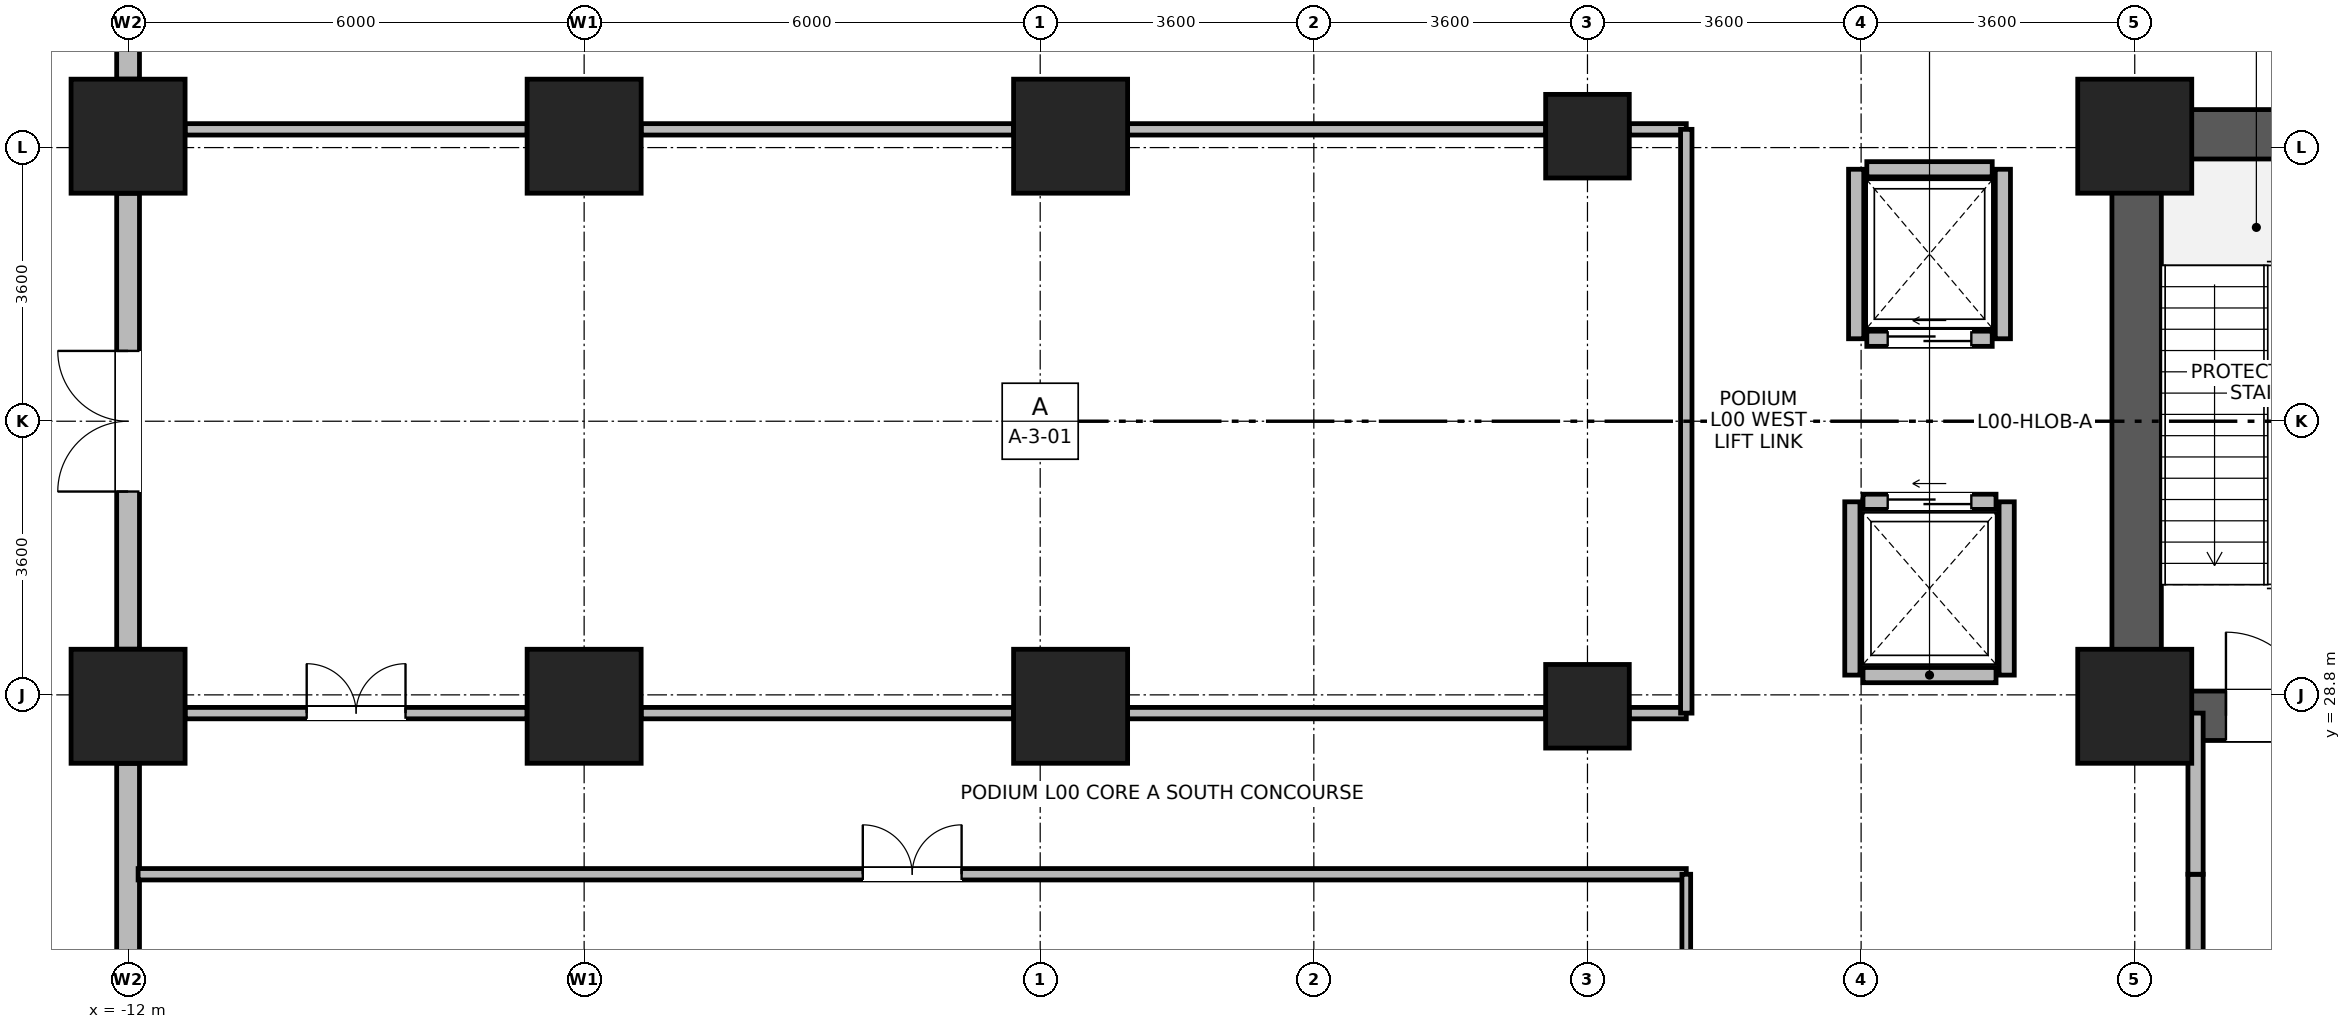
"""IFC4 building model, lengths in metres.
Left out: names, types, materials, properties, quantities, classifications, styles, units other than length and angle.
Written with IfcOpenShell. Run it as: python <this file> out.ifc"""

import sys

from ifc_helpers import new_model, si_unit, direction, frame, frame_2d, origin, origin_2d, place, context, subcontext, project, spatial, rectangle, circle, extrude, source, transform, mapped, element, fill, save


model = new_model("IFC4")
c1 = context("Model", 3, precision=1e-05, world=origin(), true_north=direction((0.0, 1.0)))
c2 = subcontext(c1, "Body", "Model", "MODEL_VIEW")
j1 = project(units=[si_unit("LENGTHUNIT", "METRE"), si_unit("PLANEANGLEUNIT", "RADIAN")], contexts=[c1])
p1 = place(None, origin())
s1 = spatial("IfcSite", under=j1, at=p1, CompositionType="ELEMENT")
p2 = place(p1, origin())
s2 = spatial("IfcBuilding", under=s1, at=p2, CompositionType="ELEMENT")
p3 = place(p2, origin())
s3 = spatial("IfcBuildingStorey", under=s2, at=p3, CompositionType="ELEMENT", Elevation=0.0)
p4 = place(p3, frame((14.425, 28.2, 0.0), z_axis=(0.0, 0.0, 1.0), x_axis=(0.0, 1.0, 0.0)))
e1 = element("IfcWall", 1, at=p4, inside=s3, PredefinedType="SHEAR", context=c2, shape_type="SweptSolid", body=[
    extrude(rectangle(XDim=8.3, YDim=0.65, at=frame_2d((4.15, 0.0))), origin(), (0.0, 0.0, 1.0), 5.12),
])
p5 = place(p3, frame((14.75, 28.525, 0.0), z_axis=(0.0, 0.0, 1.0), x_axis=(1.0, 0.0, 0.0)))
e2 = element("IfcWall", 2, at=p5, inside=s3, PredefinedType="SHEAR", context=c2, shape_type="SweptSolid", body=[
    extrude(rectangle(XDim=3.2, YDim=0.65, at=frame_2d((1.6, 0.0))), origin(), (0.0, 0.0, 1.0), 5.12),
])
p6 = place(p5, frame((0.85, 0.0, 0.0)))
e3 = element("IfcOpeningElement", 3, at=p6, cuts=e2, PredefinedType="OPENING", context=c2, shape_type="SweptSolid", body=[
    extrude(rectangle(XDim=1.1, YDim=2.08, at=frame_2d((0.55, 1.04))), frame((0.0, 0.335, 0.0), z_axis=(0.0, -1.0, 0.0), x_axis=(1.0, 0.0, 0.0)), (0.0, 0.0, 1.0), 0.67),
])
p7 = place(p3, frame((14.75, 36.175, 0.0), z_axis=(0.0, 0.0, 1.0), x_axis=(1.0, 0.0, 0.0)))
e4 = element("IfcWall", 4, at=p7, inside=s3, PredefinedType="SHEAR", context=c2, shape_type="SweptSolid", body=[
    extrude(rectangle(XDim=3.2, YDim=0.65, at=frame_2d((1.6, 0.0))), origin(), (0.0, 0.0, 1.0), 5.12),
])
m1 = source(origin(), c2, "Body", "SweptSolid", [
    extrude(circle(Radius=0.55, at=origin_2d()), origin(), (0.0, 0.0, 1.0), 5.4),
])
for number, where, z_axis, x_axis in (
    (5, (7.2, 28.65, 0.0), (0.0, 0.0, 1.0), (1.0, 0.0, 0.0)),
    (6, (7.2, 36.15, 0.0), (0.0, 0.0, 1.0), (1.0, 0.0, 0.0)),
):
    element("IfcColumn", number, at=place(p3, frame(where, z_axis=z_axis, x_axis=x_axis)), inside=s3, PredefinedType="COLUMN", context=c2, shape_type="MappedRepresentation", body=[
        mapped(m1, transform((0.0, 0.0, 0.0), x_axis=(1.0, 0.0, 0.0), y_axis=(0.0, 1.0, 0.0), z_axis=(0.0, 0.0, 1.0), scale=1.0)),
    ])
m2 = source(origin(), c2, "Body", "SweptSolid", [
    extrude(rectangle(XDim=1.5, YDim=1.5, at=origin_2d()), origin(), (0.0, 0.0, 1.0), 5.4),
])
for number, where, z_axis, x_axis in (
    (7, (14.4, 28.65, 0.0), (0.0, 0.0, 1.0), (1.0, 0.0, 0.0)),
    (8, (14.4, 36.15, 0.0), (0.0, 0.0, 1.0), (1.0, 0.0, 0.0)),
    (9, (0.4, 28.65, 0.0), (0.0, 0.0, 1.0), (1.0, 0.0, 0.0)),
    (10, (0.4, 36.15, 0.0), (0.0, 0.0, 1.0), (1.0, 0.0, 0.0)),
    (11, (-12.0, 28.65, 0.0), (0.0, 0.0, 1.0), (1.0, 0.0, 0.0)),
    (12, (-12.0, 36.15, 0.0), (0.0, 0.0, 1.0), (1.0, 0.0, 0.0)),
    (13, (-6.0, 28.65, 0.0), (0.0, 0.0, 1.0), (1.0, 0.0, 0.0)),
    (14, (-6.0, 36.15, 0.0), (0.0, 0.0, 1.0), (1.0, 0.0, 0.0)),
):
    element("IfcColumn", number, at=place(p3, frame(where, z_axis=z_axis, x_axis=x_axis)), inside=s3, PredefinedType="COLUMN", context=c2, shape_type="MappedRepresentation", body=[
        mapped(m2, transform((0.0, 0.0, 0.0), x_axis=(1.0, 0.0, 0.0), y_axis=(0.0, 1.0, 0.0), z_axis=(0.0, 0.0, 1.0), scale=1.0)),
    ])
p8 = place(p3, frame((-12.0, 36.901, 0.0), z_axis=(0.0, 0.0, 1.0), x_axis=(0.0, 1.0, 0.0)))
e15 = element("IfcWall", 15, at=p8, inside=s3, PredefinedType="STANDARD", context=c2, shape_type="SweptSolid", body=[
    extrude(rectangle(XDim=7.198, YDim=0.3, at=frame_2d((3.599, 0.0))), origin(), (0.0, 0.0, 1.0), 4.5),
])
p9 = place(p8, frame((4.198, 0.0, 0.9)))
e16 = element("IfcOpeningElement", 16, at=p9, cuts=e15, PredefinedType="OPENING", context=c2, shape_type="SweptSolid", body=[
    extrude(rectangle(XDim=2.4, YDim=2.5, at=frame_2d((1.2, 1.25))), frame((0.0, 0.16, 0.0), z_axis=(0.0, -1.0, 0.0), x_axis=(1.0, 0.0, 0.0)), (0.0, 0.0, 1.0), 0.32),
])
p10 = place(p8, frame((2.548, 0.0, 0.9)))
e17 = element("IfcOpeningElement", 17, at=p10, cuts=e15, PredefinedType="OPENING", context=c2, shape_type="SweptSolid", body=[
    extrude(rectangle(XDim=0.95, YDim=1.75, at=frame_2d((0.475, 0.875))), frame((0.0, 0.16, 0.0), z_axis=(0.0, -1.0, 0.0), x_axis=(1.0, 0.0, 0.0)), (0.0, 0.0, 1.0), 0.32),
])
p11 = place(p3, frame((-12.0, 29.401, 0.0), z_axis=(0.0, 0.0, 1.0), x_axis=(0.0, 1.0, 0.0)))
e18 = element("IfcWall", 18, at=p11, inside=s3, PredefinedType="STANDARD", context=c2, shape_type="SweptSolid", body=[
    extrude(rectangle(XDim=5.998, YDim=0.3, at=frame_2d((2.999, 0.0))), origin(), (0.0, 0.0, 1.0), 4.5),
])
p12 = place(p11, frame((2.074, 0.0, 0.0)))
e19 = element("IfcOpeningElement", 19, at=p12, cuts=e18, PredefinedType="OPENING", context=c2, shape_type="SweptSolid", body=[
    extrude(rectangle(XDim=1.85, YDim=2.25, at=frame_2d((0.925, 1.125))), frame((0.0, 0.16, 0.0), z_axis=(0.0, -1.0, 0.0), x_axis=(1.0, 0.0, 0.0)), (0.0, 0.0, 1.0), 0.32),
])
p13 = place(p3, frame((-12.0, 18.751, 0.0), z_axis=(0.0, 0.0, 1.0), x_axis=(0.0, 1.0, 0.0)))
e20 = element("IfcWall", 20, at=p13, inside=s3, PredefinedType="STANDARD", context=c2, shape_type="SweptSolid", body=[
    extrude(rectangle(XDim=9.148, YDim=0.3, at=frame_2d((4.574, 0.0))), origin(), (0.0, 0.0, 1.0), 4.5),
])
p14 = place(p13, frame((0.325, 0.0, 0.9)))
e21 = element("IfcOpeningElement", 21, at=p14, cuts=e20, PredefinedType="OPENING", context=c2, shape_type="SweptSolid", body=[
    extrude(rectangle(XDim=2.4, YDim=2.5, at=frame_2d((1.2, 1.25))), frame((0.0, 0.16, 0.0), z_axis=(0.0, -1.0, 0.0), x_axis=(1.0, 0.0, 0.0)), (0.0, 0.0, 1.0), 0.32),
])
p15 = place(p13, frame((3.374, 0.0, 0.9)))
e22 = element("IfcOpeningElement", 22, at=p15, cuts=e20, PredefinedType="OPENING", context=c2, shape_type="SweptSolid", body=[
    extrude(rectangle(XDim=2.4, YDim=2.5, at=frame_2d((1.2, 1.25))), frame((0.0, 0.16, 0.0), z_axis=(0.0, -1.0, 0.0), x_axis=(1.0, 0.0, 0.0)), (0.0, 0.0, 1.0), 0.32),
])
p16 = place(p3, frame((10.825, 29.06, 0.0), z_axis=(0.0, 0.0, 1.0), x_axis=(1.0, 0.0, 0.0)))
e23 = element("IfcWall", 23, at=p16, inside=s3, PredefinedType="PARTITIONING", context=c2, shape_type="SweptSolid", body=[
    extrude(rectangle(XDim=1.75, YDim=0.2, at=frame_2d((0.875, 0.0))), origin(), (0.0, 0.0, 1.0), 5.1),
])
p17 = place(p3, frame((10.825, 31.34, 0.0), z_axis=(0.0, 0.0, 1.0), x_axis=(1.0, 0.0, 0.0)))
e24 = element("IfcWall", 24, at=p17, inside=s3, PredefinedType="PARTITIONING", context=c2, shape_type="SweptSolid", body=[
    extrude(rectangle(XDim=1.75, YDim=0.2, at=frame_2d((0.875, 0.0))), origin(), (0.0, 0.0, 1.0), 5.1),
])
p18 = place(p17, frame((0.325, 0.0, 0.0)))
e25 = element("IfcOpeningElement", 25, at=p18, cuts=e24, PredefinedType="OPENING", context=c2, shape_type="SweptSolid", body=[
    extrude(rectangle(XDim=1.1, YDim=2.12, at=frame_2d((0.55, 1.06))), frame((0.0, 0.11, 0.0), z_axis=(0.0, -1.0, 0.0), x_axis=(1.0, 0.0, 0.0)), (0.0, 0.0, 1.0), 0.22),
])
for number, where, z_axis, x_axis in (
    (26, (10.685, 29.06, 0.0), (0.0, 0.0, 1.0), (0.0, 1.0, 0.0)),
    (27, (12.715, 29.06, 0.0), (0.0, 0.0, 1.0), (0.0, 1.0, 0.0)),
):
    element("IfcWall", number, at=place(p3, frame(where, z_axis=z_axis, x_axis=x_axis)), inside=s3, PredefinedType="PARTITIONING", context=c2, shape_type="SweptSolid", body=[
        extrude(rectangle(XDim=2.28, YDim=0.2, at=frame_2d((1.14, 0.0))), origin(), (0.0, 0.0, 1.0), 5.1),
    ])
p19 = place(p3, frame((10.875, 33.485, 0.0), z_axis=(0.0, 0.0, 1.0), x_axis=(1.0, 0.0, 0.0)))
e28 = element("IfcWall", 28, at=p19, inside=s3, PredefinedType="PARTITIONING", context=c2, shape_type="SweptSolid", body=[
    extrude(rectangle(XDim=1.65, YDim=0.2, at=frame_2d((0.825, 0.0))), origin(), (0.0, 0.0, 1.0), 5.1),
])
p20 = place(p19, frame((0.275, 0.0, 0.0)))
e29 = element("IfcOpeningElement", 29, at=p20, cuts=e28, PredefinedType="OPENING", context=c2, shape_type="SweptSolid", body=[
    extrude(rectangle(XDim=1.1, YDim=2.12, at=frame_2d((0.55, 1.06))), frame((0.0, 0.11, 0.0), z_axis=(0.0, -1.0, 0.0), x_axis=(1.0, 0.0, 0.0)), (0.0, 0.0, 1.0), 0.22),
])
p21 = place(p3, frame((10.875, 35.715, 0.0), z_axis=(0.0, 0.0, 1.0), x_axis=(1.0, 0.0, 0.0)))
e30 = element("IfcWall", 30, at=p21, inside=s3, PredefinedType="PARTITIONING", context=c2, shape_type="SweptSolid", body=[
    extrude(rectangle(XDim=1.65, YDim=0.2, at=frame_2d((0.825, 0.0))), origin(), (0.0, 0.0, 1.0), 5.1),
])
for number, where, z_axis, x_axis in (
    (31, (10.735, 33.485, 0.0), (0.0, 0.0, 1.0), (0.0, 1.0, 0.0)),
    (32, (12.665, 33.485, 0.0), (0.0, 0.0, 1.0), (0.0, 1.0, 0.0)),
):
    element("IfcWall", number, at=place(p3, frame(where, z_axis=z_axis, x_axis=x_axis)), inside=s3, PredefinedType="PARTITIONING", context=c2, shape_type="SweptSolid", body=[
        extrude(rectangle(XDim=2.23, YDim=0.2, at=frame_2d((1.115, 0.0))), origin(), (0.0, 0.0, 1.0), 5.1),
    ])
p22 = place(p3, frame((15.2, 18.132, 0.0), z_axis=(0.0, 0.0, 1.0), x_axis=(0.0, 1.0, 0.0)))
e33 = element("IfcWall", 33, at=p22, inside=s3, PredefinedType="PARTITIONING", context=c2, shape_type="SweptSolid", body=[
    extrude(rectangle(XDim=8.308, YDim=0.2, at=frame_2d((4.154, 0.0))), origin(), (0.0, 0.0, 1.0), 5.1),
])
p23 = place(p3, frame((15.2, 26.44, 0.0), z_axis=(0.0, 0.0, 1.0), x_axis=(0.0, 1.0, 0.0)))
e34 = element("IfcWall", 34, at=p23, inside=s3, PredefinedType="PARTITIONING", context=c2, shape_type="SweptSolid", body=[
    extrude(rectangle(XDim=2.12, YDim=0.2, at=frame_2d((1.06, 0.0))), origin(), (0.0, 0.0, 1.0), 5.1),
])
p24 = place(p3, frame((-11.868, 26.44, 0.0), z_axis=(0.0, 0.0, 1.0), x_axis=(1.0, 0.0, 0.0)))
e35 = element("IfcWall", 35, at=p24, inside=s3, PredefinedType="PARTITIONING", context=c2, shape_type="SweptSolid", body=[
    extrude(rectangle(XDim=20.368, YDim=0.15, at=frame_2d((10.184, 0.0))), origin(), (0.0, 0.0, 1.0), 5.1),
])
p25 = place(p24, frame((9.534, 0.0, 0.0)))
e36 = element("IfcOpeningElement", 36, at=p25, cuts=e35, PredefinedType="OPENING", context=c2, shape_type="SweptSolid", body=[
    extrude(rectangle(XDim=1.3, YDim=2.12, at=frame_2d((0.65, 1.06))), frame((0.0, 0.085, 0.0), z_axis=(0.0, -1.0, 0.0), x_axis=(1.0, 0.0, 0.0)), (0.0, 0.0, 1.0), 0.17),
])
p26 = place(p3, frame((-11.25, 28.56, 0.0), z_axis=(0.0, 0.0, 1.0), x_axis=(1.0, 0.0, 0.0)))
e37 = element("IfcWall", 37, at=p26, inside=s3, PredefinedType="PARTITIONING", context=c2, shape_type="SweptSolid", body=[
    extrude(rectangle(XDim=4.5, YDim=0.15, at=frame_2d((2.25, 0.0))), origin(), (0.0, 0.0, 1.0), 4.4),
])
p27 = place(p26, frame((1.6, 0.0, 0.0)))
e38 = element("IfcOpeningElement", 38, at=p27, cuts=e37, PredefinedType="OPENING", context=c2, shape_type="SweptSolid", body=[
    extrude(rectangle(XDim=1.3, YDim=2.12, at=frame_2d((0.65, 1.06))), frame((0.0, 0.085, 0.0), z_axis=(0.0, -1.0, 0.0), x_axis=(1.0, 0.0, 0.0)), (0.0, 0.0, 1.0), 0.17),
])
p28 = place(p3, frame((-5.25, 28.56, 0.0), z_axis=(0.0, 0.0, 1.0), x_axis=(1.0, 0.0, 0.0)))
e39 = element("IfcWall", 39, at=p28, inside=s3, PredefinedType="PARTITIONING", context=c2, shape_type="SweptSolid", body=[
    extrude(rectangle(XDim=4.9, YDim=0.15, at=frame_2d((2.45, 0.0))), origin(), (0.0, 0.0, 1.0), 4.4),
])
p29 = place(p3, frame((1.15, 28.56, 0.0), z_axis=(0.0, 0.0, 1.0), x_axis=(1.0, 0.0, 0.0)))
e40 = element("IfcWall", 40, at=p29, inside=s3, PredefinedType="PARTITIONING", context=c2, shape_type="SweptSolid", body=[
    extrude(rectangle(XDim=5.5, YDim=0.15, at=frame_2d((2.75, 0.0))), origin(), (0.0, 0.0, 1.0), 4.4),
])
p30 = place(p3, frame((7.75, 28.56, 0.0), z_axis=(0.0, 0.0, 1.0), x_axis=(1.0, 0.0, 0.0)))
e41 = element("IfcWall", 41, at=p30, inside=s3, PredefinedType="PARTITIONING", context=c2, shape_type="SweptSolid", body=[
    extrude(rectangle(XDim=0.75, YDim=0.15, at=frame_2d((0.375, 0.0))), origin(), (0.0, 0.0, 1.0), 4.4),
])
p31 = place(p3, frame((-11.25, 36.24, 0.0), z_axis=(0.0, 0.0, 1.0), x_axis=(1.0, 0.0, 0.0)))
e42 = element("IfcWall", 42, at=p31, inside=s3, PredefinedType="PARTITIONING", context=c2, shape_type="SweptSolid", body=[
    extrude(rectangle(XDim=4.5, YDim=0.15, at=frame_2d((2.25, 0.0))), origin(), (0.0, 0.0, 1.0), 4.4),
])
p32 = place(p3, frame((-5.25, 36.24, 0.0), z_axis=(0.0, 0.0, 1.0), x_axis=(1.0, 0.0, 0.0)))
e43 = element("IfcWall", 43, at=p32, inside=s3, PredefinedType="PARTITIONING", context=c2, shape_type="SweptSolid", body=[
    extrude(rectangle(XDim=4.9, YDim=0.15, at=frame_2d((2.45, 0.0))), origin(), (0.0, 0.0, 1.0), 4.4),
])
p33 = place(p3, frame((1.15, 36.24, 0.0), z_axis=(0.0, 0.0, 1.0), x_axis=(1.0, 0.0, 0.0)))
e44 = element("IfcWall", 44, at=p33, inside=s3, PredefinedType="PARTITIONING", context=c2, shape_type="SweptSolid", body=[
    extrude(rectangle(XDim=5.5, YDim=0.15, at=frame_2d((2.75, 0.0))), origin(), (0.0, 0.0, 1.0), 4.4),
])
p34 = place(p3, frame((7.75, 36.24, 0.0), z_axis=(0.0, 0.0, 1.0), x_axis=(1.0, 0.0, 0.0)))
e45 = element("IfcWall", 45, at=p34, inside=s3, PredefinedType="PARTITIONING", context=c2, shape_type="SweptSolid", body=[
    extrude(rectangle(XDim=0.75, YDim=0.15, at=frame_2d((0.375, 0.0))), origin(), (0.0, 0.0, 1.0), 4.4),
])
p35 = place(p3, frame((8.5, 28.56, 0.0), z_axis=(0.0, 0.0, 1.0), x_axis=(0.0, 1.0, 0.0)))
e46 = element("IfcWall", 46, at=p35, inside=s3, PredefinedType="PARTITIONING", context=c2, shape_type="SweptSolid", body=[
    extrude(rectangle(XDim=7.68, YDim=0.15, at=frame_2d((3.84, 0.0))), origin(), (0.0, 0.0, 1.0), 5.1),
])
p36 = place(p3, frame((8.5, 18.132, 0.0), z_axis=(0.0, 0.0, 1.0), x_axis=(0.0, 1.0, 0.0)))
e47 = element("IfcWall", 47, at=p36, inside=s3, PredefinedType="PARTITIONING", context=c2, shape_type="SweptSolid", body=[
    extrude(rectangle(XDim=8.308, YDim=0.115, at=frame_2d((4.154, 0.0))), origin(), (0.0, 0.0, 1.0), 5.1),
])
p37 = place(p12, origin())
e48 = element("IfcDoor", 48, at=p37, inside=s3, OperationType="DOUBLE_DOOR_SINGLE_SWING", PredefinedType="DOOR", context=c2, shape_type="SweptSolid", body=[
    extrude(rectangle(XDim=1.85, YDim=2.25, at=frame_2d((0.925, 1.125))), frame((0.0, 0.025, 0.0), z_axis=(0.0, -1.0, 0.0), x_axis=(1.0, 0.0, 0.0)), (0.0, 0.0, 1.0), 0.05),
])
fill(e19, e48)
p38 = place(p6, origin())
e49 = element("IfcDoor", 49, at=p38, inside=s3, OperationType="SINGLE_SWING_LEFT", PredefinedType="DOOR", context=c2, shape_type="SweptSolid", body=[
    extrude(rectangle(XDim=1.1, YDim=2.08, at=frame_2d((0.55, 1.04))), frame((0.0, 0.025, 0.0), z_axis=(0.0, -1.0, 0.0), x_axis=(1.0, 0.0, 0.0)), (0.0, 0.0, 1.0), 0.05),
])
fill(e3, e49)
p39 = place(p18, origin())
e50 = element("IfcDoor", 50, at=p39, inside=s3, OperationType="SLIDING_TO_LEFT", PredefinedType="DOOR", context=c2, shape_type="SweptSolid", body=[
    extrude(rectangle(XDim=1.1, YDim=2.12, at=frame_2d((0.55, 1.06))), frame((0.0, 0.025, 0.0), z_axis=(0.0, -1.0, 0.0), x_axis=(1.0, 0.0, 0.0)), (0.0, 0.0, 1.0), 0.05),
])
fill(e25, e50)
p40 = place(p20, origin())
e51 = element("IfcDoor", 51, at=p40, inside=s3, OperationType="SLIDING_TO_LEFT", PredefinedType="DOOR", context=c2, shape_type="SweptSolid", body=[
    extrude(rectangle(XDim=1.1, YDim=2.12, at=frame_2d((0.55, 1.06))), frame((0.0, 0.025, 0.0), z_axis=(0.0, -1.0, 0.0), x_axis=(1.0, 0.0, 0.0)), (0.0, 0.0, 1.0), 0.05),
])
fill(e29, e51)
p41 = place(p25, origin())
e52 = element("IfcDoor", 52, at=p41, inside=s3, OperationType="DOUBLE_DOOR_SINGLE_SWING", PredefinedType="DOOR", context=c2, shape_type="SweptSolid", body=[
    extrude(rectangle(XDim=1.3, YDim=2.12, at=frame_2d((0.65, 1.06))), frame((0.0, 0.025, 0.0), z_axis=(0.0, -1.0, 0.0), x_axis=(1.0, 0.0, 0.0)), (0.0, 0.0, 1.0), 0.05),
])
fill(e36, e52)
p42 = place(p27, origin())
e53 = element("IfcDoor", 53, at=p42, inside=s3, OperationType="DOUBLE_DOOR_SINGLE_SWING", PredefinedType="DOOR", context=c2, shape_type="SweptSolid", body=[
    extrude(rectangle(XDim=1.3, YDim=2.12, at=frame_2d((0.65, 1.06))), frame((0.0, 0.025, 0.0), z_axis=(0.0, -1.0, 0.0), x_axis=(1.0, 0.0, 0.0)), (0.0, 0.0, 1.0), 0.05),
])
fill(e38, e53)
save(model, sys.argv[1])
